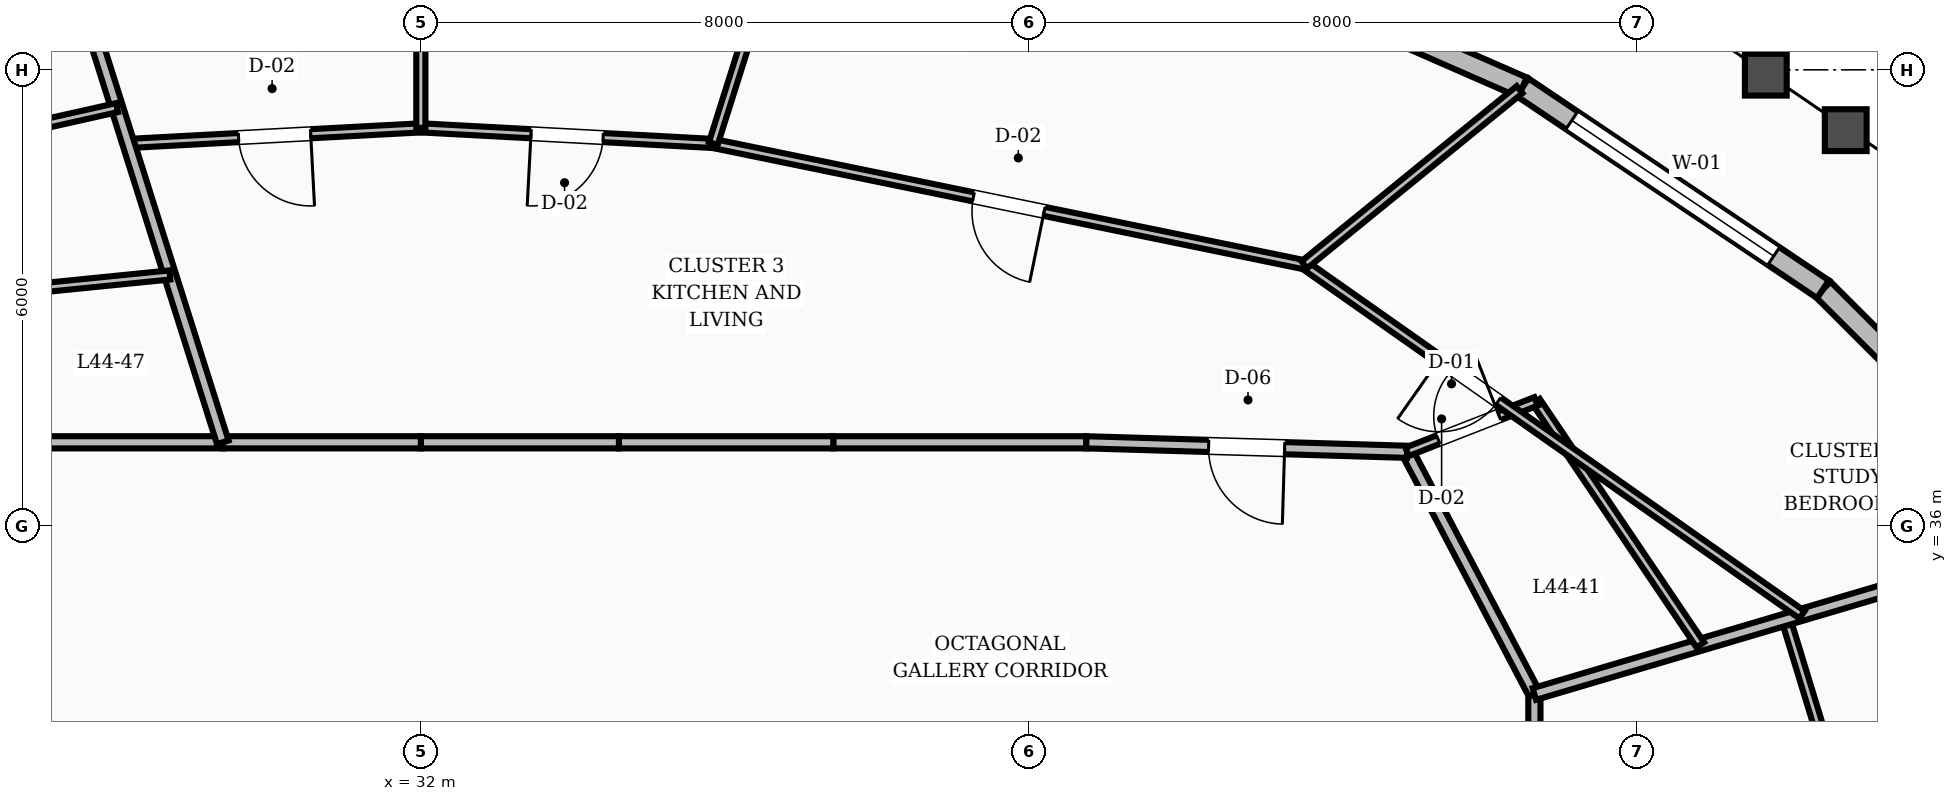
"""IFC4 building model, lengths in metres.
Left out: names, types, materials, properties, quantities, classifications, styles, units other than length and angle.
Written with IfcOpenShell. Run it as: python <this file> out.ifc"""

import sys

from ifc_helpers import new_model, si_unit, direction, frame, frame_2d, origin, place, context, subcontext, project, spatial, rectangle, extrude, element, fill, save


model = new_model("IFC4")
c1 = context("Model", 3, precision=1e-05, world=origin(), true_north=direction((0.0, 1.0)))
c2 = subcontext(c1, "Body", "Model", "MODEL_VIEW")
j1 = project(units=[si_unit("LENGTHUNIT", "METRE"), si_unit("PLANEANGLEUNIT", "RADIAN")], contexts=[c1])
p1 = place(None, origin())
s1 = spatial("IfcSite", under=j1, at=p1, CompositionType="ELEMENT")
p2 = place(p1, origin())
s2 = spatial("IfcBuilding", under=s1, at=p2, CompositionType="ELEMENT")
p3 = place(p2, frame((0.0, 0.0, 171.2)))
s3 = spatial("IfcBuildingStorey", under=s2, at=p3, CompositionType="ELEMENT", Elevation=171.2)
p4 = place(p3, frame((53.691, 35.875, 0.0), z_axis=(0.0, 0.0, 1.0), x_axis=(-0.707692376563, 0.706520700443, 0.0)))
e1 = element("IfcWall", 1, at=p4, inside=s3, PredefinedType="STANDARD", context=c2, shape_type="SweptSolid", body=[
    extrude(rectangle(XDim=4.584, YDim=0.28, at=frame_2d((2.292, 0.0))), origin(), (0.0, 0.0, 1.0), 2.82),
])
p5 = place(p3, frame((50.447, 39.113, 0.0), z_axis=(0.0, 0.0, 1.0), x_axis=(-0.82985197946, 0.557983594909, 0.0)))
e2 = element("IfcWall", 2, at=p5, inside=s3, PredefinedType="STANDARD", context=c2, shape_type="SweptSolid", body=[
    extrude(rectangle(XDim=4.764, YDim=0.28, at=frame_2d((2.382, 0.0))), origin(), (0.0, 0.0, 1.0), 2.82),
])
p6 = place(p5, frame((0.782, 0.0, 0.8)))
e3 = element("IfcOpeningElement", 3, at=p6, cuts=e2, PredefinedType="OPENING", context=c2, shape_type="SweptSolid", body=[
    extrude(rectangle(XDim=3.2, YDim=1.65, at=frame_2d((1.6, 0.825))), frame((0.0, 0.15, 0.0), z_axis=(0.0, -1.0, 0.0), x_axis=(1.0, 0.0, 0.0)), (0.0, 0.0, 1.0), 0.3),
])
p7 = place(p3, frame((46.494, 41.771, 0.0), z_axis=(0.0, 0.0, 1.0), x_axis=(-0.916018444192, 0.401136148832, 0.0)))
e4 = element("IfcWall", 4, at=p7, inside=s3, PredefinedType="STANDARD", context=c2, shape_type="SweptSolid", body=[
    extrude(rectangle(XDim=4.924, YDim=0.28, at=frame_2d((2.462, 0.0))), origin(), (0.0, 0.0, 1.0), 2.82),
])
p8 = place(p3, frame((46.65, 30.068, 0.0), z_axis=(0.0, 0.0, 1.0), x_axis=(0.0, 1.0, 0.0)))
e5 = element("IfcWall", 5, at=p8, inside=s3, PredefinedType="SOLIDWALL", context=c2, shape_type="SweptSolid", body=[
    extrude(rectangle(XDim=3.721, YDim=0.16, at=frame_2d((1.86, 0.0))), origin(), (0.0, 0.0, 1.0), 2.8),
])
p9 = place(p3, frame((46.65, 33.789, 0.0), z_axis=(0.0, 0.0, 1.0), x_axis=(-0.46527115782, 0.885168204185, 0.0)))
e6 = element("IfcWall", 6, at=p9, inside=s3, PredefinedType="SOLIDWALL", context=c2, shape_type="SweptSolid", body=[
    extrude(rectangle(XDim=3.6, YDim=0.16, at=frame_2d((1.8, 0.0))), origin(), (0.0, 0.0, 1.0), 2.8),
])
p10 = place(p3, frame((44.975, 36.975, 0.0), z_axis=(0.0, 0.0, 1.0), x_axis=(-0.999561990195, 0.029594387265, 0.0)))
e7 = element("IfcWall", 7, at=p10, inside=s3, PredefinedType="SOLIDWALL", context=c2, shape_type="SweptSolid", body=[
    extrude(rectangle(XDim=4.224, YDim=0.16, at=frame_2d((2.112, 0.0))), origin(), (0.0, 0.0, 1.0), 2.8),
])
p11 = place(p10, frame((1.612, 0.0, 0.0)))
e8 = element("IfcOpeningElement", 8, at=p11, cuts=e7, PredefinedType="OPENING", context=c2, shape_type="SweptSolid", body=[
    extrude(rectangle(XDim=1.0, YDim=2.1, at=frame_2d((0.5, 1.05))), frame((0.0, 0.09, 0.0), z_axis=(0.0, -1.0, 0.0), x_axis=(1.0, 0.0, 0.0)), (0.0, 0.0, 1.0), 0.18),
])
p12 = place(p3, frame((40.753, 37.1, 0.0), z_axis=(0.0, 0.0, 1.0), x_axis=(-1.0, 0.0, 0.0)))
e9 = element("IfcWall", 9, at=p12, inside=s3, PredefinedType="SOLIDWALL", context=c2, shape_type="SweptSolid", body=[
    extrude(rectangle(XDim=3.327, YDim=0.16, at=frame_2d((1.664, 0.0))), origin(), (0.0, 0.0, 1.0), 2.8),
])
p13 = place(p3, frame((37.426, 37.1, 0.0), z_axis=(0.0, 0.0, 1.0), x_axis=(-1.0, 0.0, 0.0)))
e10 = element("IfcWall", 10, at=p13, inside=s3, PredefinedType="SOLIDWALL", context=c2, shape_type="SweptSolid", body=[
    extrude(rectangle(XDim=2.821, YDim=0.16, at=frame_2d((1.41, 0.0))), origin(), (0.0, 0.0, 1.0), 2.8),
])
for number, where, z_axis, x_axis in (
    (11, (34.606, 37.1, 0.0), (0.0, 0.0, 1.0), (-1.0, 0.0, 0.0)),
    (12, (32.0, 37.1, 0.0), (0.0, 0.0, 1.0), (-1.0, 0.0, 0.0)),
):
    element("IfcWall", number, at=place(p3, frame(where, z_axis=z_axis, x_axis=x_axis)), inside=s3, PredefinedType="SOLIDWALL", context=c2, shape_type="SweptSolid", body=[
        extrude(rectangle(XDim=2.606, YDim=0.16, at=frame_2d((1.303, 0.0))), origin(), (0.0, 0.0, 1.0), 2.8),
    ])
p14 = place(p3, frame((29.394, 37.1, 0.0), z_axis=(0.0, 0.0, 1.0), x_axis=(-1.0, 0.0, 0.0)))
e13 = element("IfcWall", 13, at=p14, inside=s3, PredefinedType="SOLIDWALL", context=c2, shape_type="SweptSolid", body=[
    extrude(rectangle(XDim=2.821, YDim=0.16, at=frame_2d((1.41, 0.0))), origin(), (0.0, 0.0, 1.0), 2.8),
])
p15 = place(p3, frame((51.092, 31.06, 0.0), z_axis=(0.0, 0.0, 1.0), x_axis=(-0.292120966116, 0.956381378507, 0.0)))
e14 = element("IfcWall", 14, at=p15, inside=s3, PredefinedType="PARTITIONING", context=c2, shape_type="SweptSolid", body=[
    extrude(rectangle(XDim=3.878, YDim=0.12, at=frame_2d((1.939, 0.0))), origin(), (0.0, 0.0, 1.0), 2.8),
])
p16 = place(p15, frame((1.464, 0.0, 0.0)))
e15 = element("IfcOpeningElement", 15, at=p16, cuts=e14, PredefinedType="OPENING", context=c2, shape_type="SweptSolid", body=[
    extrude(rectangle(XDim=0.95, YDim=2.1, at=frame_2d((0.475, 1.05))), frame((0.0, 0.07, 0.0), z_axis=(0.0, -1.0, 0.0), x_axis=(1.0, 0.0, 0.0)), (0.0, 0.0, 1.0), 0.14),
])
p17 = place(p3, frame((46.65, 33.789, 0.0), z_axis=(0.0, 0.0, 1.0), x_axis=(0.958820059034, 0.284014250337, 0.0)))
e16 = element("IfcWall", 16, at=p17, inside=s3, PredefinedType="SOLIDWALL", context=c2, shape_type="SweptSolid", body=[
    extrude(rectangle(XDim=7.294, YDim=0.16, at=frame_2d((3.647, 0.0))), origin(), (0.0, 0.0, 1.0), 2.8),
])
p18 = place(p3, frame((48.833, 34.435, 0.0), z_axis=(0.0, 0.0, 1.0), x_axis=(-0.559401227458, 0.828897018162, 0.0)))
e17 = element("IfcWall", 17, at=p18, inside=s3, PredefinedType="PARTITIONING", context=c2, shape_type="SweptSolid", body=[
    extrude(rectangle(XDim=3.864, YDim=0.12, at=frame_2d((1.932, 0.0))), origin(), (0.0, 0.0, 1.0), 2.8),
])
p19 = place(p3, frame((44.975, 36.975, 0.0), z_axis=(0.0, 0.0, 1.0), x_axis=(0.931414749869, 0.363959563312, 0.0)))
e18 = element("IfcWall", 18, at=p19, inside=s3, PredefinedType="PARTITIONING", context=c2, shape_type="SweptSolid", body=[
    extrude(rectangle(XDim=1.821, YDim=0.12, at=frame_2d((0.911, 0.0))), origin(), (0.0, 0.0, 1.0), 2.8),
])
p20 = place(p19, frame((0.44, 0.0, 0.0)))
e19 = element("IfcOpeningElement", 19, at=p20, cuts=e18, PredefinedType="OPENING", context=c2, shape_type="SweptSolid", body=[
    extrude(rectangle(XDim=0.86, YDim=2.1, at=frame_2d((0.43, 1.05))), frame((0.0, 0.07, 0.0), z_axis=(0.0, -1.0, 0.0), x_axis=(1.0, 0.0, 0.0)), (0.0, 0.0, 1.0), 0.14),
])
p21 = place(p3, frame((50.171, 34.832, 0.0), z_axis=(0.0, 0.0, 1.0), x_axis=(-0.81799193286, 0.57522969132, 0.0)))
e20 = element("IfcWall", 20, at=p21, inside=s3, PredefinedType="PARTITIONING", context=c2, shape_type="SweptSolid", body=[
    extrude(rectangle(XDim=8.004, YDim=0.12, at=frame_2d((4.002, 0.0))), origin(), (0.0, 0.0, 1.0), 2.8),
])
p22 = place(p21, frame((4.885, 0.0, 0.0)))
e21 = element("IfcOpeningElement", 21, at=p22, cuts=e20, PredefinedType="OPENING", context=c2, shape_type="SweptSolid", body=[
    extrude(rectangle(XDim=0.95, YDim=2.1, at=frame_2d((0.475, 1.05))), frame((0.0, 0.07, 0.0), z_axis=(0.0, -1.0, 0.0), x_axis=(1.0, 0.0, 0.0)), (0.0, 0.0, 1.0), 0.14),
])
p23 = place(p3, frame((43.623, 39.436, 0.0), z_axis=(0.0, 0.0, 1.0), x_axis=(-0.979585309952, 0.201028904702, 0.0)))
e22 = element("IfcWall", 22, at=p23, inside=s3, PredefinedType="PARTITIONING", context=c2, shape_type="SweptSolid", body=[
    extrude(rectangle(XDim=7.938, YDim=0.12, at=frame_2d((3.969, 0.0))), origin(), (0.0, 0.0, 1.0), 2.8),
])
p24 = place(p23, frame((3.494, 0.0, 0.0)))
e23 = element("IfcOpeningElement", 23, at=p24, cuts=e22, PredefinedType="OPENING", context=c2, shape_type="SweptSolid", body=[
    extrude(rectangle(XDim=0.95, YDim=2.1, at=frame_2d((0.475, 1.05))), frame((0.0, 0.07, 0.0), z_axis=(0.0, -1.0, 0.0), x_axis=(1.0, 0.0, 0.0)), (0.0, 0.0, 1.0), 0.14),
])
p25 = place(p3, frame((43.623, 39.436, 0.0), z_axis=(0.0, 0.0, 1.0), x_axis=(0.77566783813, 0.63114135096, 0.0)))
e24 = element("IfcWall", 24, at=p25, inside=s3, PredefinedType="PARTITIONING", context=c2, shape_type="SweptSolid", body=[
    extrude(rectangle(XDim=3.65, YDim=0.12, at=frame_2d((1.825, 0.0))), origin(), (0.0, 0.0, 1.0), 2.8),
])
p26 = place(p3, frame((35.848, 41.031, 0.0), z_axis=(0.0, 0.0, 1.0), x_axis=(-0.998579231715, 0.053287127784, 0.0)))
e25 = element("IfcWall", 25, at=p26, inside=s3, PredefinedType="PARTITIONING", context=c2, shape_type="SweptSolid", body=[
    extrude(rectangle(XDim=3.853, YDim=0.12, at=frame_2d((1.927, 0.0))), origin(), (0.0, 0.0, 1.0), 2.8),
])
p27 = place(p26, frame((1.452, 0.0, 0.0)))
e26 = element("IfcOpeningElement", 26, at=p27, cuts=e25, PredefinedType="OPENING", context=c2, shape_type="SweptSolid", body=[
    extrude(rectangle(XDim=0.95, YDim=2.1, at=frame_2d((0.475, 1.05))), frame((0.0, 0.07, 0.0), z_axis=(0.0, -1.0, 0.0), x_axis=(1.0, 0.0, 0.0)), (0.0, 0.0, 1.0), 0.14),
])
p28 = place(p3, frame((35.848, 41.031, 0.0), z_axis=(0.0, 0.0, 1.0), x_axis=(0.301226041054, 0.953552763192, 0.0)))
e27 = element("IfcWall", 27, at=p28, inside=s3, PredefinedType="PARTITIONING", context=c2, shape_type="SweptSolid", body=[
    extrude(rectangle(XDim=4.073, YDim=0.12, at=frame_2d((2.036, 0.0))), origin(), (0.0, 0.0, 1.0), 2.8),
])
p29 = place(p3, frame((32.0, 41.237, 0.0), z_axis=(0.0, 0.0, 1.0), x_axis=(-0.998579231715, -0.053287127784, 0.0)))
e28 = element("IfcWall", 28, at=p29, inside=s3, PredefinedType="PARTITIONING", context=c2, shape_type="SweptSolid", body=[
    extrude(rectangle(XDim=3.853, YDim=0.12, at=frame_2d((1.927, 0.0))), origin(), (0.0, 0.0, 1.0), 2.8),
])
p30 = place(p29, frame((1.452, 0.0, 0.0)))
e29 = element("IfcOpeningElement", 29, at=p30, cuts=e28, PredefinedType="OPENING", context=c2, shape_type="SweptSolid", body=[
    extrude(rectangle(XDim=0.95, YDim=2.1, at=frame_2d((0.475, 1.05))), frame((0.0, 0.07, 0.0), z_axis=(0.0, -1.0, 0.0), x_axis=(1.0, 0.0, 0.0)), (0.0, 0.0, 1.0), 0.14),
])
p31 = place(p3, frame((32.0, 41.237, 0.0), z_axis=(0.0, 0.0, 1.0), x_axis=(0.0, 1.0, 0.0)))
e30 = element("IfcWall", 30, at=p31, inside=s3, PredefinedType="PARTITIONING", context=c2, shape_type="SweptSolid", body=[
    extrude(rectangle(XDim=4.087, YDim=0.12, at=frame_2d((2.043, 0.0))), origin(), (0.0, 0.0, 1.0), 2.8),
])
p32 = place(p3, frame((29.394, 37.1, 0.0), z_axis=(0.0, 0.0, 1.0), x_axis=(-0.301228312568, 0.953552045621, 0.0)))
e31 = element("IfcWall", 31, at=p32, inside=s3, PredefinedType="SOLIDWALL", context=c2, shape_type="SweptSolid", body=[
    extrude(rectangle(XDim=8.196, YDim=0.16, at=frame_2d((4.098, 0.0))), origin(), (0.0, 0.0, 1.0), 2.8),
])
p33 = place(p3, frame((28.699, 39.302, 0.0), z_axis=(0.0, 0.0, 1.0), x_axis=(-0.995023035558, -0.099645164006, 0.0)))
e32 = element("IfcWall", 32, at=p33, inside=s3, PredefinedType="PARTITIONING", context=c2, shape_type="SweptSolid", body=[
    extrude(rectangle(XDim=3.418, YDim=0.12, at=frame_2d((1.709, 0.0))), origin(), (0.0, 0.0, 1.0), 2.8),
])
p34 = place(p3, frame((28.003, 41.503, 0.0), z_axis=(0.0, 0.0, 1.0), x_axis=(-0.975777479016, -0.218765425617, 0.0)))
e33 = element("IfcWall", 33, at=p34, inside=s3, PredefinedType="PARTITIONING", context=c2, shape_type="SweptSolid", body=[
    extrude(rectangle(XDim=8.169, YDim=0.12, at=frame_2d((4.084, 0.0))), origin(), (0.0, 0.0, 1.0), 2.8),
])
p35 = place(p34, frame((5.004, 0.0, 0.0)))
e34 = element("IfcOpeningElement", 34, at=p35, cuts=e33, PredefinedType="OPENING", context=c2, shape_type="SweptSolid", body=[
    extrude(rectangle(XDim=0.95, YDim=2.1, at=frame_2d((0.475, 1.05))), frame((0.0, 0.07, 0.0), z_axis=(0.0, -1.0, 0.0), x_axis=(1.0, 0.0, 0.0)), (0.0, 0.0, 1.0), 0.14),
])
p36 = place(p6, origin())
e35 = element("IfcWindow", 35, at=p36, inside=s3, PartitioningType="SINGLE_PANEL", PredefinedType="WINDOW", context=c2, shape_type="SweptSolid", body=[
    extrude(rectangle(XDim=3.2, YDim=1.65, at=frame_2d((1.6, 0.825))), frame((0.0, 0.03, 0.0), z_axis=(0.0, -1.0, 0.0), x_axis=(1.0, 0.0, 0.0)), (0.0, 0.0, 1.0), 0.06),
])
fill(e3, e35)
p37 = place(p20, origin())
e36 = element("IfcDoor", 36, at=p37, inside=s3, OperationType="SINGLE_SWING_RIGHT", PredefinedType="DOOR", context=c2, shape_type="SweptSolid", body=[
    extrude(rectangle(XDim=0.86, YDim=2.1, at=frame_2d((0.43, 1.05))), frame((0.0, 0.025, 0.0), z_axis=(0.0, -1.0, 0.0), x_axis=(1.0, 0.0, 0.0)), (0.0, 0.0, 1.0), 0.05),
])
fill(e19, e36)
p38 = place(p11, origin())
e37 = element("IfcDoor", 37, at=p38, inside=s3, OperationType="SINGLE_SWING_LEFT", PredefinedType="DOOR", context=c2, shape_type="SweptSolid", body=[
    extrude(rectangle(XDim=1.0, YDim=2.1, at=frame_2d((0.5, 1.05))), frame((0.0, 0.025, 0.0), z_axis=(0.0, -1.0, 0.0), x_axis=(1.0, 0.0, 0.0)), (0.0, 0.0, 1.0), 0.05),
])
fill(e8, e37)
p39 = place(p22, origin())
e38 = element("IfcDoor", 38, at=p39, inside=s3, OperationType="SINGLE_SWING_RIGHT", PredefinedType="DOOR", context=c2, shape_type="SweptSolid", body=[
    extrude(rectangle(XDim=0.95, YDim=2.1, at=frame_2d((0.475, 1.05))), frame((0.0, 0.025, 0.0), z_axis=(0.0, -1.0, 0.0), x_axis=(1.0, 0.0, 0.0)), (0.0, 0.0, 1.0), 0.05),
])
fill(e21, e38)
p40 = place(p24, origin())
e39 = element("IfcDoor", 39, at=p40, inside=s3, OperationType="SINGLE_SWING_LEFT", PredefinedType="DOOR", context=c2, shape_type="SweptSolid", body=[
    extrude(rectangle(XDim=0.95, YDim=2.1, at=frame_2d((0.475, 1.05))), frame((0.0, 0.025, 0.0), z_axis=(0.0, -1.0, 0.0), x_axis=(1.0, 0.0, 0.0)), (0.0, 0.0, 1.0), 0.05),
])
fill(e23, e39)
p41 = place(p27, origin())
e40 = element("IfcDoor", 40, at=p41, inside=s3, OperationType="SINGLE_SWING_RIGHT", PredefinedType="DOOR", context=c2, shape_type="SweptSolid", body=[
    extrude(rectangle(XDim=0.95, YDim=2.1, at=frame_2d((0.475, 1.05))), frame((0.0, 0.025, 0.0), z_axis=(0.0, -1.0, 0.0), x_axis=(1.0, 0.0, 0.0)), (0.0, 0.0, 1.0), 0.05),
])
fill(e26, e40)
p42 = place(p30, origin())
e41 = element("IfcDoor", 41, at=p42, inside=s3, OperationType="SINGLE_SWING_LEFT", PredefinedType="DOOR", context=c2, shape_type="SweptSolid", body=[
    extrude(rectangle(XDim=0.95, YDim=2.1, at=frame_2d((0.475, 1.05))), frame((0.0, 0.025, 0.0), z_axis=(0.0, -1.0, 0.0), x_axis=(1.0, 0.0, 0.0)), (0.0, 0.0, 1.0), 0.05),
])
fill(e29, e41)
save(model, sys.argv[1])
